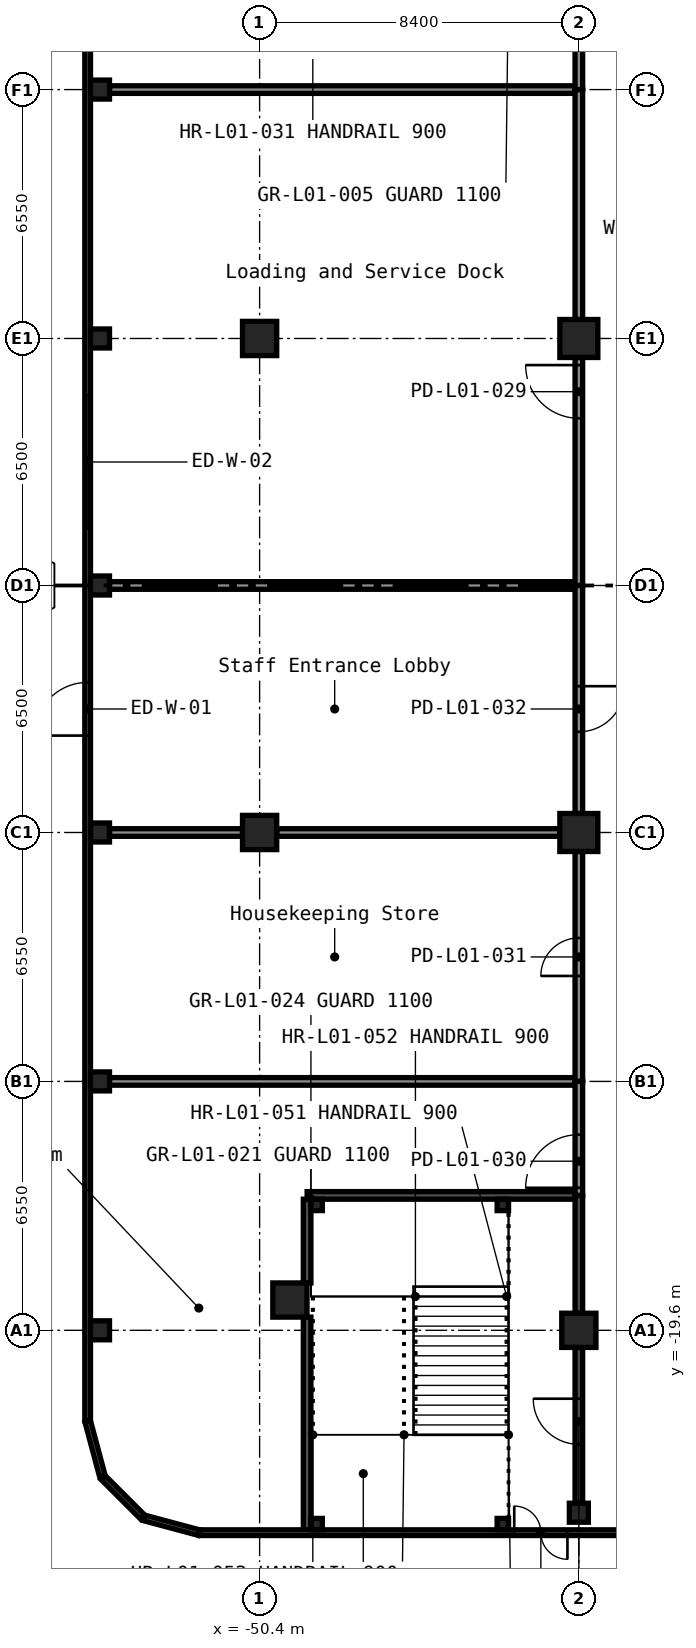
"""IFC4 building model, lengths in metres.
Left out: names, types, materials, properties, quantities, classifications, styles, units other than length and angle.
Written with IfcOpenShell. Run it as: python <this file> out.ifc"""

import sys

from ifc_helpers import new_model, si_unit, direction, frame, frame_2d, origin, origin_2d, place, context, subcontext, project, spatial, rectangle, hollow_rectangle, extrude, element, fill, save


model = new_model("IFC4")
c1 = context("Model", 3, precision=1e-05, world=origin(), true_north=direction((0.0, 1.0)))
c2 = subcontext(c1, "Body", "Model", "MODEL_VIEW")
j1 = project(units=[si_unit("LENGTHUNIT", "METRE"), si_unit("PLANEANGLEUNIT", "RADIAN")], contexts=[c1])
p1 = place(None, origin())
s1 = spatial("IfcSite", under=j1, at=p1, CompositionType="ELEMENT")
p2 = place(p1, origin())
s2 = spatial("IfcBuilding", under=s1, at=p2, CompositionType="ELEMENT")
p3 = place(p2, origin())
s3 = spatial("IfcBuildingStorey", under=s2, at=p3, CompositionType="ELEMENT", Elevation=0.0)
for number, where, z_axis, x_axis in (
    (1, (-49.603, -18.803, -0.3), (0.0, 0.0, 1.0), (1.0, 0.0, 0.0)),
    (2, (-50.4, -6.5, -0.3), (0.0, 0.0, 1.0), (1.0, 0.0, 0.0)),
    (3, (-50.4, 6.5, -0.3), (0.0, 0.0, 1.0), (1.0, 0.0, 0.0)),
    (4, (-42.0, -19.6, -0.3), (0.0, 0.0, 1.0), (1.0, 0.0, 0.0)),
):
    element("IfcColumn", number, at=place(p3, frame(where, z_axis=z_axis, x_axis=x_axis)), inside=s3, PredefinedType="COLUMN", context=c2, shape_type="SweptSolid", body=[
        extrude(hollow_rectangle(XDim=0.9, YDim=0.9, WallThickness=0.036, at=origin_2d()), origin(), (0.0, 0.0, 1.0), 8.9),
    ])
for number, where, z_axis, x_axis in (
    (5, (-42.0, -6.5, -0.3), (0.0, 0.0, 1.0), (1.0, 0.0, 0.0)),
    (6, (-42.0, 6.5, -0.3), (0.0, 0.0, 1.0), (1.0, 0.0, 0.0)),
):
    element("IfcColumn", number, at=place(p3, frame(where, z_axis=z_axis, x_axis=x_axis)), inside=s3, PredefinedType="COLUMN", context=c2, shape_type="SweptSolid", body=[
        extrude(hollow_rectangle(XDim=1.0, YDim=1.0, WallThickness=0.04, at=origin_2d()), origin(), (0.0, 0.0, 1.0), 8.9),
    ])
for number, where, z_axis, x_axis in (
    (7, (-42.0, -24.4, -0.3), (0.0, 0.0, 1.0), (1.0, 0.0, 0.0)),
    (8, (-54.6, -19.6, -0.3), (0.0, 0.0, 1.0), (1.0, 0.0, 0.0)),
    (9, (-54.6, -13.05, -0.3), (0.0, 0.0, 1.0), (1.0, 0.0, 0.0)),
    (10, (-54.6, -6.5, -0.3), (0.0, 0.0, 1.0), (1.0, 0.0, 0.0)),
    (11, (-54.6, 0.0, -0.3), (0.0, 0.0, 1.0), (1.0, 0.0, 0.0)),
    (12, (-54.6, 6.5, -0.3), (0.0, 0.0, 1.0), (1.0, 0.0, 0.0)),
    (13, (-54.6, 13.05, -0.3), (0.0, 0.0, 1.0), (1.0, 0.0, 0.0)),
):
    element("IfcColumn", number, at=place(p3, frame(where, z_axis=z_axis, x_axis=x_axis)), inside=s3, PredefinedType="COLUMN", context=c2, shape_type="SweptSolid", body=[
        extrude(hollow_rectangle(XDim=0.5, YDim=0.5, WallThickness=0.019, InnerFilletRadius=0.029, OuterFilletRadius=0.048, at=origin_2d()), origin(), (0.0, 0.0, 1.0), 8.9),
    ])
p4 = place(p3, frame((-54.35, 13.05, 0.0), z_axis=(0.0, 0.0, 1.0), x_axis=(1.0, 0.0, 0.0)))
e14 = element("IfcWall", 14, at=p4, inside=s3, PredefinedType="PARTITIONING", context=c2, shape_type="SweptSolid", body=[
    extrude(rectangle(XDim=12.25, YDim=0.2, at=frame_2d((6.125, 0.0))), origin(), (0.0, 0.0, 1.0), 8.6),
])
p5 = place(p3, frame((-54.35, -6.5, 0.0), z_axis=(0.0, 0.0, 1.0), x_axis=(1.0, 0.0, 0.0)))
e15 = element("IfcWall", 15, at=p5, inside=s3, PredefinedType="PARTITIONING", context=c2, shape_type="SweptSolid", body=[
    extrude(rectangle(XDim=3.5, YDim=0.2, at=frame_2d((1.75, 0.0))), origin(), (0.0, 0.0, 1.0), 8.6),
])
p6 = place(p3, frame((-49.95, -6.5, 0.0), z_axis=(0.0, 0.0, 1.0), x_axis=(1.0, 0.0, 0.0)))
e16 = element("IfcWall", 16, at=p6, inside=s3, PredefinedType="PARTITIONING", context=c2, shape_type="SweptSolid", body=[
    extrude(rectangle(XDim=7.45, YDim=0.2, at=frame_2d((3.725, 0.0))), origin(), (0.0, 0.0, 1.0), 8.6),
])
p7 = place(p3, frame((-54.35, -13.05, 0.0), z_axis=(0.0, 0.0, 1.0), x_axis=(1.0, 0.0, 0.0)))
e17 = element("IfcWall", 17, at=p7, inside=s3, PredefinedType="PARTITIONING", context=c2, shape_type="SweptSolid", body=[
    extrude(rectangle(XDim=12.25, YDim=0.2, at=frame_2d((6.125, 0.0))), origin(), (0.0, 0.0, 1.0), 8.6),
])
p8 = place(p3, frame((-49.15, -24.85, 0.0), z_axis=(0.0, 0.0, 1.0), x_axis=(0.0, 1.0, 0.0)))
e18 = element("IfcWall", 18, at=p8, inside=s3, PredefinedType="SHEAR", context=c2, shape_type="SweptSolid", body=[
    extrude(rectangle(XDim=5.597, YDim=0.2, at=frame_2d((2.798, 0.0))), origin(), (0.0, 0.0, 1.0), 8.6),
])
p9 = place(p3, frame((-49.15, -18.353, 0.0), z_axis=(0.0, 0.0, 1.0), x_axis=(0.0, 1.0, 0.0)))
e19 = element("IfcWall", 19, at=p9, inside=s3, PredefinedType="SHEAR", context=c2, shape_type="SweptSolid", body=[
    extrude(rectangle(XDim=2.203, YDim=0.2, at=frame_2d((1.102, 0.0))), origin(), (0.0, 0.0, 1.0), 8.6),
])
p10 = place(p3, frame((-49.15, -16.05, 0.0), z_axis=(0.0, 0.0, 1.0), x_axis=(1.0, 0.0, 0.0)))
e20 = element("IfcWall", 20, at=p10, inside=s3, PredefinedType="SHEAR", context=c2, shape_type="SweptSolid", body=[
    extrude(rectangle(XDim=7.05, YDim=0.2, at=frame_2d((3.525, 0.0))), origin(), (0.0, 0.0, 1.0), 8.6),
])
p11 = place(p3, frame((-42.0, -16.05, 0.0), z_axis=(0.0, 0.0, 1.0), x_axis=(0.0, -1.0, 0.0)))
e21 = element("IfcWall", 21, at=p11, inside=s3, PredefinedType="SHEAR", context=c2, shape_type="SweptSolid", body=[
    extrude(rectangle(XDim=3.1, YDim=0.2, at=frame_2d((1.55, 0.0))), origin(), (0.0, 0.0, 1.0), 8.6),
])
p12 = place(p3, frame((-42.0, -20.05, 0.0), z_axis=(0.0, 0.0, 1.0), x_axis=(0.0, -1.0, 0.0)))
e22 = element("IfcWall", 22, at=p12, inside=s3, PredefinedType="SHEAR", context=c2, shape_type="SweptSolid", body=[
    extrude(rectangle(XDim=4.1, YDim=0.2, at=frame_2d((2.05, 0.0))), origin(), (0.0, 0.0, 1.0), 8.6),
])
p13 = place(p12, frame((1.35, 0.0, 0.0)))
e23 = element("IfcOpeningElement", 23, at=p13, cuts=e22, PredefinedType="OPENING", context=c2, shape_type="SweptSolid", body=[
    extrude(rectangle(XDim=1.2, YDim=2.1, at=frame_2d((0.6, 1.05))), frame((0.0, 0.11, 0.0), z_axis=(0.0, -1.0, 0.0), x_axis=(1.0, 0.0, 0.0)), (0.0, 0.0, 1.0), 0.22),
])
p14 = place(p3, frame((-54.35, 0.0, 0.0), z_axis=(0.0, 0.0, 1.0), x_axis=(1.0, 0.0, 0.0)))
e24 = element("IfcWall", 24, at=p14, inside=s3, PredefinedType="PARTITIONING", context=c2, shape_type="SweptSolid", body=[
    extrude(rectangle(XDim=12.25, YDim=0.2, at=frame_2d((6.125, 0.0))), origin(), (0.0, 0.0, 1.0), 8.6),
])
p15 = place(p3, frame((-42.0, 0.0, 0.0), z_axis=(0.0, 0.0, 1.0), x_axis=(0.0, 1.0, 0.0)))
e25 = element("IfcWall", 25, at=p15, inside=s3, PredefinedType="PARTITIONING", context=c2, shape_type="SweptSolid", body=[
    extrude(rectangle(XDim=6.0, YDim=0.2, at=frame_2d((3.0, 0.0))), origin(), (0.0, 0.0, 1.0), 8.6),
])
p16 = place(p15, frame((4.4, 0.0, 0.0)))
e26 = element("IfcOpeningElement", 26, at=p16, cuts=e25, PredefinedType="OPENING", context=c2, shape_type="SweptSolid", body=[
    extrude(rectangle(XDim=1.4, YDim=2.1, at=frame_2d((0.7, 1.05))), frame((0.0, 0.11, 0.0), z_axis=(0.0, -1.0, 0.0), x_axis=(1.0, 0.0, 0.0)), (0.0, 0.0, 1.0), 0.22),
])
p17 = place(p3, frame((-42.0, 7.0, 0.0), z_axis=(0.0, 0.0, 1.0), x_axis=(0.0, 1.0, 0.0)))
e27 = element("IfcWall", 27, at=p17, inside=s3, PredefinedType="PARTITIONING", context=c2, shape_type="SweptSolid", body=[
    extrude(rectangle(XDim=6.05, YDim=0.2, at=frame_2d((3.025, 0.0))), origin(), (0.0, 0.0, 1.0), 8.6),
])
p18 = place(p3, frame((-42.0, -13.05, 0.0), z_axis=(0.0, 0.0, 1.0), x_axis=(0.0, 1.0, 0.0)))
e28 = element("IfcWall", 28, at=p18, inside=s3, PredefinedType="PARTITIONING", context=c2, shape_type="SweptSolid", body=[
    extrude(rectangle(XDim=6.05, YDim=0.2, at=frame_2d((3.025, 0.0))), origin(), (0.0, 0.0, 1.0), 8.6),
])
p19 = place(p18, frame((2.775, 0.0, 0.0)))
e29 = element("IfcOpeningElement", 29, at=p19, cuts=e28, PredefinedType="OPENING", context=c2, shape_type="SweptSolid", body=[
    extrude(rectangle(XDim=1.0, YDim=2.1, at=frame_2d((0.5, 1.05))), frame((0.0, 0.11, 0.0), z_axis=(0.0, -1.0, 0.0), x_axis=(1.0, 0.0, 0.0)), (0.0, 0.0, 1.0), 0.22),
])
p20 = place(p3, frame((-42.0, 13.05, 0.0), z_axis=(0.0, 0.0, 1.0), x_axis=(0.0, 1.0, 0.0)))
e30 = element("IfcWall", 30, at=p20, inside=s3, PredefinedType="PARTITIONING", context=c2, shape_type="SweptSolid", body=[
    extrude(rectangle(XDim=3.0, YDim=0.2, at=frame_2d((1.5, 0.0))), origin(), (0.0, 0.0, 1.0), 8.6),
])
p21 = place(p20, frame((1.4, 0.0, 0.0)))
e31 = element("IfcOpeningElement", 31, at=p21, cuts=e30, PredefinedType="OPENING", context=c2, shape_type="SweptSolid", body=[
    extrude(rectangle(XDim=1.4, YDim=2.1, at=frame_2d((0.7, 1.05))), frame((0.0, 0.11, 0.0), z_axis=(0.0, -1.0, 0.0), x_axis=(1.0, 0.0, 0.0)), (0.0, 0.0, 1.0), 0.22),
])
p22 = place(p3, frame((-42.0, -16.05, 0.0), z_axis=(0.0, 0.0, 1.0), x_axis=(0.0, 1.0, 0.0)))
e32 = element("IfcWall", 32, at=p22, inside=s3, PredefinedType="PARTITIONING", context=c2, shape_type="SweptSolid", body=[
    extrude(rectangle(XDim=3.0, YDim=0.2, at=frame_2d((1.5, 0.0))), origin(), (0.0, 0.0, 1.0), 8.6),
])
p23 = place(p22, frame((0.2, 0.0, 0.0)))
e33 = element("IfcOpeningElement", 33, at=p23, cuts=e32, PredefinedType="OPENING", context=c2, shape_type="SweptSolid", body=[
    extrude(rectangle(XDim=1.4, YDim=2.1, at=frame_2d((0.7, 1.05))), frame((0.0, 0.11, 0.0), z_axis=(0.0, -1.0, 0.0), x_axis=(1.0, 0.0, 0.0)), (0.0, 0.0, 1.0), 0.22),
])
p24 = place(p3, frame((-42.0, -6.0, 0.0), z_axis=(0.0, 0.0, 1.0), x_axis=(0.0, 1.0, 0.0)))
e34 = element("IfcWall", 34, at=p24, inside=s3, PredefinedType="PARTITIONING", context=c2, shape_type="SweptSolid", body=[
    extrude(rectangle(XDim=6.0, YDim=0.2, at=frame_2d((3.0, 0.0))), origin(), (0.0, 0.0, 1.0), 8.6),
])
p25 = place(p24, frame((2.15, 0.0, 0.0)))
e35 = element("IfcOpeningElement", 35, at=p25, cuts=e34, PredefinedType="OPENING", context=c2, shape_type="SweptSolid", body=[
    extrude(rectangle(XDim=1.2, YDim=2.1, at=frame_2d((0.6, 1.05))), frame((0.0, 0.11, 0.0), z_axis=(0.0, -1.0, 0.0), x_axis=(1.0, 0.0, 0.0)), (0.0, 0.0, 1.0), 0.22),
])
p26 = place(p3, frame((-8.4, -24.925, 0.0), z_axis=(0.0, 0.0, 1.0), x_axis=(-1.0, 0.0, 0.0)))
e36 = element("IfcWall", 36, at=p26, inside=s3, PredefinedType="STANDARD", context=c2, shape_type="SweptSolid", body=[
    extrude(rectangle(XDim=43.58, YDim=0.15, at=frame_2d((21.79, 0.0))), origin(), (0.0, 0.0, 1.0), 8.6),
])
p27 = place(p26, frame((33.9, 0.0, 0.0)))
e37 = element("IfcOpeningElement", 37, at=p27, cuts=e36, PredefinedType="OPENING", context=c2, shape_type="SweptSolid", body=[
    extrude(rectangle(XDim=1.4, YDim=2.1, at=frame_2d((0.7, 1.05))), frame((0.0, 0.085, 0.0), z_axis=(0.0, -1.0, 0.0), x_axis=(1.0, 0.0, 0.0)), (0.0, 0.0, 1.0), 0.17),
])
p28 = place(p26, frame((14.225, 0.0, 0.0)))
e38 = element("IfcOpeningElement", 38, at=p28, cuts=e36, PredefinedType="OPENING", context=c2, shape_type="SweptSolid", body=[
    extrude(rectangle(XDim=1.8, YDim=2.1, at=frame_2d((0.9, 1.05))), frame((0.0, 0.085, 0.0), z_axis=(0.0, -1.0, 0.0), x_axis=(1.0, 0.0, 0.0)), (0.0, 0.0, 1.0), 0.17),
])
p29 = place(p3, frame((-52.0, -24.922, 0.0), z_axis=(0.0, 0.0, 1.0), x_axis=(-0.965946591624, 0.258741535379, 0.0)))
e39 = element("IfcWall", 39, at=p29, inside=s3, PredefinedType="STANDARD", context=c2, shape_type="SweptSolid", body=[
    extrude(rectangle(XDim=1.493, YDim=0.15, at=frame_2d((0.746, 0.0))), origin(), (0.0, 0.0, 1.0), 8.6),
])
p30 = place(p3, frame((-53.475, -24.517, 0.0), z_axis=(0.0, 0.0, 1.0), x_axis=(-0.707106781187, 0.707106781187, 0.0)))
e40 = element("IfcWall", 40, at=p30, inside=s3, PredefinedType="STANDARD", context=c2, shape_type="SweptSolid", body=[
    extrude(rectangle(XDim=1.473, YDim=0.15, at=frame_2d((0.736, 0.0))), origin(), (0.0, 0.0, 1.0), 8.6),
])
p31 = place(p3, frame((-54.536, -23.442, 0.0), z_axis=(0.0, 0.0, 1.0), x_axis=(-0.258741535379, 0.965946591624, 0.0)))
e41 = element("IfcWall", 41, at=p31, inside=s3, PredefinedType="STANDARD", context=c2, shape_type="SweptSolid", body=[
    extrude(rectangle(XDim=1.493, YDim=0.15, at=frame_2d((0.746, 0.0))), origin(), (0.0, 0.0, 1.0), 8.6),
])
p32 = place(p3, frame((-54.925, -21.98, 0.0), z_axis=(0.0, 0.0, 1.0), x_axis=(0.0, 1.0, 0.0)))
e42 = element("IfcWall", 42, at=p32, inside=s3, PredefinedType="STANDARD", context=c2, shape_type="SweptSolid", body=[
    extrude(rectangle(XDim=43.96, YDim=0.15, at=frame_2d((21.98, 0.0))), origin(), (0.0, 0.0, 1.0), 8.6),
])
p33 = place(p32, frame((18.03, 0.0, 0.0)))
e43 = element("IfcOpeningElement", 43, at=p33, cuts=e42, PredefinedType="OPENING", context=c2, shape_type="SweptSolid", body=[
    extrude(rectangle(XDim=1.4, YDim=2.1, at=frame_2d((0.7, 1.05))), frame((0.0, 0.085, 0.0), z_axis=(0.0, -1.0, 0.0), x_axis=(1.0, 0.0, 0.0)), (0.0, 0.0, 1.0), 0.17),
])
p34 = place(p32, frame((23.48, 0.0, 0.0)))
e44 = element("IfcOpeningElement", 44, at=p34, cuts=e42, PredefinedType="OPENING", context=c2, shape_type="SweptSolid", body=[
    extrude(rectangle(XDim=3.5, YDim=3.5, at=frame_2d((1.75, 1.75))), frame((0.0, 0.085, 0.0), z_axis=(0.0, -1.0, 0.0), x_axis=(1.0, 0.0, 0.0)), (0.0, 0.0, 1.0), 0.17),
])
for number, where, z_axis, x_axis in (
    (45, (-44.0, -24.7, 0.0), (0.0, 0.0, 1.0), (1.0, 0.0, 0.0)),
    (46, (-48.9, -24.7, 0.0), (0.0, 0.0, 1.0), (1.0, 0.0, 0.0)),
    (47, (-44.0, -16.3, 0.0), (0.0, 0.0, 1.0), (1.0, 0.0, 0.0)),
    (48, (-48.9, -16.3, 0.0), (0.0, 0.0, 1.0), (1.0, 0.0, 0.0)),
):
    element("IfcColumn", number, at=place(p3, frame(where, z_axis=z_axis, x_axis=x_axis)), inside=s3, PredefinedType="COLUMN", context=c2, shape_type="SweptSolid", body=[
        extrude(rectangle(XDim=0.3, YDim=0.3, at=origin_2d()), origin(), (0.0, 0.0, 1.0), 8.7),
    ])
p35 = place(p16, origin())
e49 = element("IfcDoor", 49, at=p35, inside=s3, OperationType="SINGLE_SWING_LEFT", PredefinedType="DOOR", context=c2, shape_type="SweptSolid", body=[
    extrude(rectangle(XDim=1.4, YDim=2.1, at=frame_2d((0.7, 1.05))), frame((0.0, 0.025, 0.0), z_axis=(0.0, -1.0, 0.0), x_axis=(1.0, 0.0, 0.0)), (0.0, 0.0, 1.0), 0.05),
])
fill(e26, e49)
p36 = place(p23, origin())
e50 = element("IfcDoor", 50, at=p36, inside=s3, OperationType="SINGLE_SWING_RIGHT", PredefinedType="DOOR", context=c2, shape_type="SweptSolid", body=[
    extrude(rectangle(XDim=1.4, YDim=2.1, at=frame_2d((0.7, 1.05))), frame((0.0, 0.025, 0.0), z_axis=(0.0, -1.0, 0.0), x_axis=(1.0, 0.0, 0.0)), (0.0, 0.0, 1.0), 0.05),
])
fill(e33, e50)
p37 = place(p19, origin())
e51 = element("IfcDoor", 51, at=p37, inside=s3, OperationType="SINGLE_SWING_RIGHT", PredefinedType="DOOR", context=c2, shape_type="SweptSolid", body=[
    extrude(rectangle(XDim=1.0, YDim=2.1, at=frame_2d((0.5, 1.05))), frame((0.0, 0.025, 0.0), z_axis=(0.0, -1.0, 0.0), x_axis=(1.0, 0.0, 0.0)), (0.0, 0.0, 1.0), 0.05),
])
fill(e29, e51)
p38 = place(p25, origin())
e52 = element("IfcDoor", 52, at=p38, inside=s3, OperationType="SINGLE_SWING_RIGHT", PredefinedType="DOOR", context=c2, shape_type="SweptSolid", body=[
    extrude(rectangle(XDim=1.2, YDim=2.1, at=frame_2d((0.6, 1.05))), frame((0.0, 0.025, 0.0), z_axis=(0.0, -1.0, 0.0), x_axis=(1.0, 0.0, 0.0)), (0.0, 0.0, 1.0), 0.05),
])
fill(e35, e52)
p39 = place(p13, origin())
e53 = element("IfcDoor", 53, at=p39, inside=s3, OperationType="SINGLE_SWING_LEFT", PredefinedType="DOOR", context=c2, shape_type="SweptSolid", body=[
    extrude(rectangle(XDim=1.2, YDim=2.1, at=frame_2d((0.6, 1.05))), frame((0.0, 0.025, 0.0), z_axis=(0.0, -1.0, 0.0), x_axis=(1.0, 0.0, 0.0)), (0.0, 0.0, 1.0), 0.05),
])
fill(e23, e53)
p40 = place(p27, origin())
e54 = element("IfcDoor", 54, at=p40, inside=s3, OperationType="DOUBLE_DOOR_SINGLE_SWING", PredefinedType="DOOR", context=c2, shape_type="SweptSolid", body=[
    extrude(rectangle(XDim=1.4, YDim=2.1, at=frame_2d((0.7, 1.05))), frame((0.0, 0.025, 0.0), z_axis=(0.0, -1.0, 0.0), x_axis=(1.0, 0.0, 0.0)), (0.0, 0.0, 1.0), 0.05),
])
fill(e37, e54)
p41 = place(p33, origin())
e55 = element("IfcDoor", 55, at=p41, inside=s3, OperationType="SINGLE_SWING_RIGHT", PredefinedType="DOOR", context=c2, shape_type="SweptSolid", body=[
    extrude(rectangle(XDim=1.4, YDim=2.1, at=frame_2d((0.7, 1.05))), frame((0.0, 0.025, 0.0), z_axis=(0.0, -1.0, 0.0), x_axis=(1.0, 0.0, 0.0)), (0.0, 0.0, 1.0), 0.05),
])
fill(e43, e55)
p42 = place(p34, origin())
e56 = element("IfcDoor", 56, at=p42, inside=s3, OperationType="ROLLINGUP", PredefinedType="DOOR", context=c2, shape_type="SweptSolid", body=[
    extrude(rectangle(XDim=3.5, YDim=3.5, at=frame_2d((1.75, 1.75))), frame((0.0, 0.025, 0.0), z_axis=(0.0, -1.0, 0.0), x_axis=(1.0, 0.0, 0.0)), (0.0, 0.0, 1.0), 0.05),
])
fill(e44, e56)
save(model, sys.argv[1])
